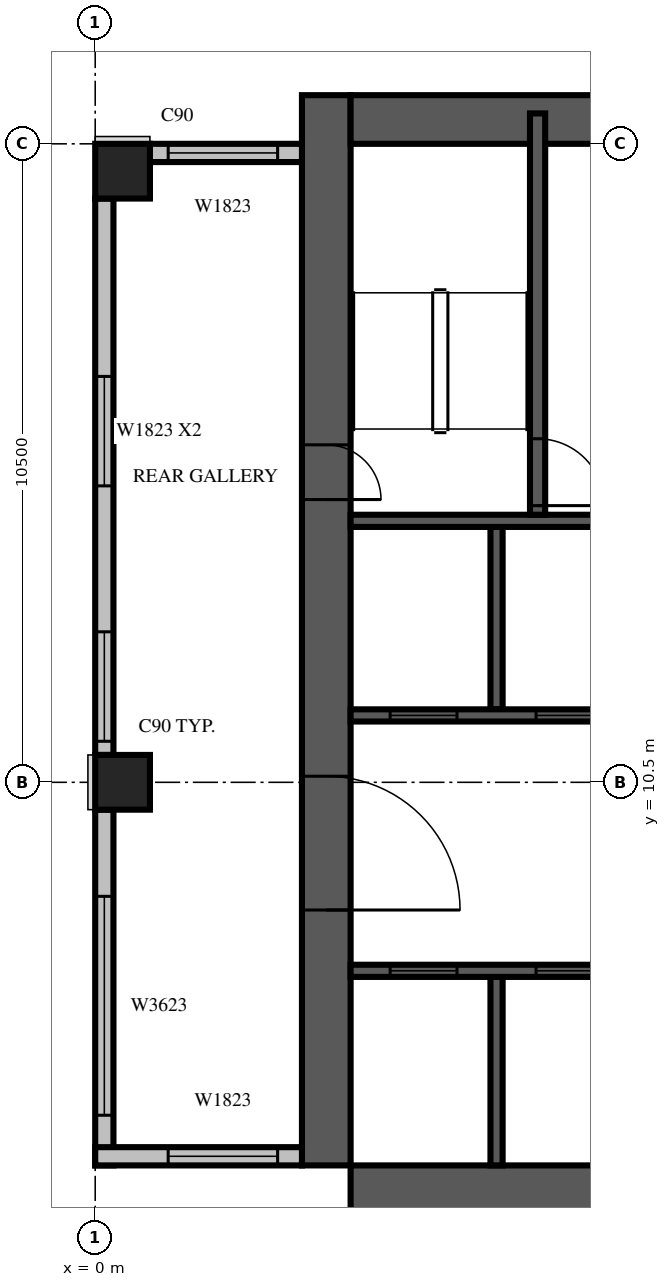
"""IFC4 building model, lengths in metres.
Left out: names, types, materials, properties, quantities, classifications, styles, units other than length and angle.
Written with IfcOpenShell. Run it as: python <this file> out.ifc"""

import sys

from ifc_helpers import new_model, si_unit, direction, frame, frame_2d, origin, origin_2d, place, context, subcontext, project, spatial, rectangle, extrude, source, transform, mapped, element, fill, save


model = new_model("IFC4")
c1 = context("Model", 3, precision=1e-05, world=origin(), true_north=direction((0.0, 1.0)))
c2 = subcontext(c1, "Body", "Model", "MODEL_VIEW")
j1 = project(units=[si_unit("LENGTHUNIT", "METRE"), si_unit("PLANEANGLEUNIT", "RADIAN")], contexts=[c1])
p1 = place(None, origin())
s1 = spatial("IfcSite", under=j1, at=p1, CompositionType="ELEMENT")
p2 = place(p1, origin())
s2 = spatial("IfcBuilding", under=s1, at=p2, CompositionType="ELEMENT")
p3 = place(p2, frame((0.0, 0.0, 189.2)))
s3 = spatial("IfcBuildingStorey", under=s2, at=p3, CompositionType="ELEMENT", Elevation=189.2)
m1 = source(origin(), c2, "Body", "SweptSolid", [
    extrude(rectangle(XDim=0.9, YDim=0.9, at=origin_2d()), origin(), (0.0, 0.0, 1.0), 3.8),
])
for number, where, z_axis, x_axis in (
    (1, (0.45, 10.5, 0.0), (0.0, 0.0, 1.0), (1.0, 0.0, 0.0)),
    (2, (0.45, 20.55, 0.0), (0.0, 0.0, 1.0), (1.0, 0.0, 0.0)),
):
    element("IfcColumn", number, at=place(p3, frame(where, z_axis=z_axis, x_axis=x_axis)), inside=s3, PredefinedType="COLUMN", context=c2, shape_type="MappedRepresentation", body=[
        mapped(m1, transform((0.0, 0.0, 0.0), scale=1.0)),
    ])
m2 = source(origin(), c2, "Body", "SweptSolid", [
    extrude(rectangle(XDim=17.6, YDim=0.8, at=frame_2d((8.8, 0.0))), origin(), (0.0, 0.0, 1.0), 3.8),
])
p4 = place(p3, frame((3.8, 4.2, 0.0), z_axis=(0.0, 0.0, 1.0), x_axis=(0.0, 1.0, 0.0)))
e3 = element("IfcWall", 3, at=p4, inside=s3, PredefinedType="SHEAR", context=c2, shape_type="MappedRepresentation", body=[
    mapped(m2, transform((0.0, 0.0, 0.0), scale=1.0)),
])
m3 = source(origin(), c2, "Body", "SweptSolid", [
    extrude(rectangle(XDim=2.2, YDim=2.1, at=frame_2d((1.1, 1.05))), frame((0.0, 0.41, 0.0), z_axis=(0.0, -1.0, 0.0), x_axis=(1.0, 0.0, 0.0)), (0.0, 0.0, 1.0), 0.82),
])
p5 = place(p4, frame((4.2, 0.0, 0.0)))
e4 = element("IfcOpeningElement", 4, at=p5, cuts=e3, PredefinedType="OPENING", context=c2, shape_type="MappedRepresentation", body=[
    mapped(m3, transform((0.0, 0.0, 0.0), scale=1.0)),
])
m4 = source(origin(), c2, "Body", "SweptSolid", [
    extrude(rectangle(XDim=0.9, YDim=2.1, at=frame_2d((0.45, 1.05))), frame((0.0, 0.41, 0.0), z_axis=(0.0, -1.0, 0.0), x_axis=(1.0, 0.0, 0.0)), (0.0, 0.0, 1.0), 0.82),
])
p6 = place(p4, frame((10.95, 0.0, 0.0)))
e5 = element("IfcOpeningElement", 5, at=p6, cuts=e3, PredefinedType="OPENING", context=c2, shape_type="MappedRepresentation", body=[
    mapped(m4, transform((0.0, 0.0, 0.0), scale=1.0)),
])
p7 = place(p3, frame((4.2, 3.8, 0.0), z_axis=(0.0, 0.0, 1.0), x_axis=(1.0, 0.0, 0.0)))
e6 = element("IfcWall", 6, at=p7, inside=s3, PredefinedType="SHEAR", context=c2, shape_type="MappedRepresentation", body=[
    mapped(m2, transform((0.0, 0.0, 0.0), scale=1.0)),
])
p8 = place(p7, frame((11.55, 0.0, 0.0)))
e7 = element("IfcOpeningElement", 7, at=p8, cuts=e6, PredefinedType="OPENING", context=c2, shape_type="MappedRepresentation", body=[
    mapped(m4, transform((0.0, 0.0, 0.0), scale=1.0)),
])
m5 = source(origin(), c2, "Body", "SweptSolid", [
    extrude(rectangle(XDim=16.8, YDim=0.8, at=frame_2d((8.4, 0.0))), origin(), (0.0, 0.0, 1.0), 3.8),
])
p9 = place(p3, frame((4.2, 21.4, 0.0), z_axis=(0.0, 0.0, 1.0), x_axis=(1.0, 0.0, 0.0)))
e8 = element("IfcWall", 8, at=p9, inside=s3, PredefinedType="SHEAR", context=c2, shape_type="MappedRepresentation", body=[
    mapped(m5, transform((0.0, 0.0, 0.0), scale=1.0)),
])
m6 = source(origin(), c2, "Body", "SweptSolid", [
    extrude(rectangle(XDim=1.2, YDim=2.1, at=frame_2d((0.6, 1.05))), frame((0.0, 0.41, 0.0), z_axis=(0.0, -1.0, 0.0), x_axis=(1.0, 0.0, 0.0)), (0.0, 0.0, 1.0), 0.82),
])
p10 = place(p9, frame((7.4, 0.0, 0.0)))
e9 = element("IfcOpeningElement", 9, at=p10, cuts=e8, PredefinedType="OPENING", context=c2, shape_type="MappedRepresentation", body=[
    mapped(m6, transform((0.0, 0.0, 0.0), scale=1.0)),
])
m7 = source(origin(), c2, "Body", "SweptSolid", [
    extrude(rectangle(XDim=2.5, YDim=0.3, at=frame_2d((1.25, 0.0))), origin(), (0.0, 0.0, 1.0), 3.4),
])
p11 = place(p3, frame((3.4, 20.85, 0.0), z_axis=(0.0, 0.0, 1.0), x_axis=(-1.0, 0.0, 0.0)))
e10 = element("IfcWall", 10, at=p11, inside=s3, PredefinedType="STANDARD", context=c2, shape_type="MappedRepresentation", body=[
    mapped(m7, transform((0.0, 0.0, 0.0), scale=1.0)),
])
m8 = source(origin(), c2, "Body", "SweptSolid", [
    extrude(rectangle(XDim=1.8, YDim=2.3, at=frame_2d((0.9, 1.15))), frame((0.0, 0.16, 0.0), z_axis=(0.0, -1.0, 0.0), x_axis=(1.0, 0.0, 0.0)), (0.0, 0.0, 1.0), 0.32),
])
p12 = place(p11, frame((0.4, 0.0, 0.6)))
e11 = element("IfcOpeningElement", 11, at=p12, cuts=e10, PredefinedType="OPENING", context=c2, shape_type="MappedRepresentation", body=[
    mapped(m8, transform((0.0, 0.0, 0.0), scale=1.0)),
])
m9 = source(origin(), c2, "Body", "SweptSolid", [
    extrude(rectangle(XDim=9.15, YDim=0.3, at=frame_2d((4.575, 0.0))), origin(), (0.0, 0.0, 1.0), 3.4),
])
p13 = place(p3, frame((0.15, 20.1, 0.0), z_axis=(0.0, 0.0, 1.0), x_axis=(0.0, -1.0, 0.0)))
e12 = element("IfcWall", 12, at=p13, inside=s3, PredefinedType="STANDARD", context=c2, shape_type="MappedRepresentation", body=[
    mapped(m9, transform((0.0, 0.0, 0.0), scale=1.0)),
])
p14 = place(p13, frame((2.925, 0.0, 0.6)))
e13 = element("IfcOpeningElement", 13, at=p14, cuts=e12, PredefinedType="OPENING", context=c2, shape_type="MappedRepresentation", body=[
    mapped(m8, transform((0.0, 0.0, 0.0), scale=1.0)),
])
p15 = place(p13, frame((7.125, 0.0, 0.6)))
e14 = element("IfcOpeningElement", 14, at=p15, cuts=e12, PredefinedType="OPENING", context=c2, shape_type="MappedRepresentation", body=[
    mapped(m8, transform((0.0, 0.0, 0.0), scale=1.0)),
])
m10 = source(origin(), c2, "Body", "SweptSolid", [
    extrude(rectangle(XDim=5.85, YDim=0.3, at=frame_2d((2.925, 0.0))), origin(), (0.0, 0.0, 1.0), 3.4),
])
p16 = place(p3, frame((0.15, 10.05, 0.0), z_axis=(0.0, 0.0, 1.0), x_axis=(0.0, -1.0, 0.0)))
e15 = element("IfcWall", 15, at=p16, inside=s3, PredefinedType="STANDARD", context=c2, shape_type="MappedRepresentation", body=[
    mapped(m10, transform((0.0, 0.0, 0.0), scale=1.0)),
])
m11 = source(origin(), c2, "Body", "SweptSolid", [
    extrude(rectangle(XDim=3.6, YDim=2.3, at=frame_2d((1.8, 1.15))), frame((0.0, 0.16, 0.0), z_axis=(0.0, -1.0, 0.0), x_axis=(1.0, 0.0, 0.0)), (0.0, 0.0, 1.0), 0.32),
])
p17 = place(p16, frame((1.425, 0.0, 0.6)))
e16 = element("IfcOpeningElement", 16, at=p17, cuts=e15, PredefinedType="OPENING", context=c2, shape_type="MappedRepresentation", body=[
    mapped(m11, transform((0.0, 0.0, 0.0), scale=1.0)),
])
m12 = source(origin(), c2, "Body", "SweptSolid", [
    extrude(rectangle(XDim=3.4, YDim=0.3, at=frame_2d((1.7, 0.0))), origin(), (0.0, 0.0, 1.0), 3.4),
])
p18 = place(p3, frame((0.0, 4.35, 0.0), z_axis=(0.0, 0.0, 1.0), x_axis=(1.0, 0.0, 0.0)))
e17 = element("IfcWall", 17, at=p18, inside=s3, PredefinedType="STANDARD", context=c2, shape_type="MappedRepresentation", body=[
    mapped(m12, transform((0.0, 0.0, 0.0), scale=1.0)),
])
p19 = place(p18, frame((1.2, 0.0, 0.6)))
e18 = element("IfcOpeningElement", 18, at=p19, cuts=e17, PredefinedType="OPENING", context=c2, shape_type="MappedRepresentation", body=[
    mapped(m8, transform((0.0, 0.0, 0.0), scale=1.0)),
])
m13 = source(origin(), c2, "Body", "SweptSolid", [
    extrude(rectangle(XDim=3.1, YDim=0.2, at=frame_2d((1.55, 0.0))), origin(), (0.0, 0.0, 1.0), 3.8),
])
p20 = place(p3, frame((6.6, 4.2, 0.0), z_axis=(0.0, 0.0, 1.0), x_axis=(0.0, 1.0, 0.0)))
e19 = element("IfcWall", 19, at=p20, inside=s3, PredefinedType="SOLIDWALL", context=c2, shape_type="MappedRepresentation", body=[
    mapped(m13, transform((0.0, 0.0, 0.0), scale=1.0)),
])
m14 = source(origin(), c2, "Body", "SweptSolid", [
    extrude(rectangle(XDim=3.0, YDim=0.2, at=frame_2d((1.5, 0.0))), origin(), (0.0, 0.0, 1.0), 3.8),
])
p21 = place(p3, frame((6.6, 11.7, 0.0), z_axis=(0.0, 0.0, 1.0), x_axis=(0.0, 1.0, 0.0)))
e20 = element("IfcWall", 20, at=p21, inside=s3, PredefinedType="SOLIDWALL", context=c2, shape_type="MappedRepresentation", body=[
    mapped(m14, transform((0.0, 0.0, 0.0), scale=1.0)),
])
m15 = source(origin(), c2, "Body", "SweptSolid", [
    extrude(rectangle(XDim=9.6, YDim=0.2, at=frame_2d((4.8, 0.0))), origin(), (0.0, 0.0, 1.0), 3.8),
])
p22 = place(p3, frame((4.2, 7.4, 0.0), z_axis=(0.0, 0.0, 1.0), x_axis=(1.0, 0.0, 0.0)))
e21 = element("IfcWall", 21, at=p22, inside=s3, PredefinedType="SOLIDWALL", context=c2, shape_type="MappedRepresentation", body=[
    mapped(m15, transform((0.0, 0.0, 0.0), scale=1.0)),
])
m16 = source(origin(), c2, "Body", "SweptSolid", [
    extrude(rectangle(XDim=1.1, YDim=2.1, at=frame_2d((0.55, 1.05))), frame((0.0, 0.11, 0.0), z_axis=(0.0, -1.0, 0.0), x_axis=(1.0, 0.0, 0.0)), (0.0, 0.0, 1.0), 0.22),
])
p23 = place(p22, frame((0.65, 0.0, 0.0)))
e22 = element("IfcOpeningElement", 22, at=p23, cuts=e21, PredefinedType="OPENING", context=c2, shape_type="MappedRepresentation", body=[
    mapped(m16, transform((0.0, 0.0, 0.0), scale=1.0)),
])
p24 = place(p22, frame((3.05, 0.0, 0.0)))
e23 = element("IfcOpeningElement", 23, at=p24, cuts=e21, PredefinedType="OPENING", context=c2, shape_type="MappedRepresentation", body=[
    mapped(m16, transform((0.0, 0.0, 0.0), scale=1.0)),
])
p25 = place(p22, frame((5.45, 0.0, 0.0)))
e24 = element("IfcOpeningElement", 24, at=p25, cuts=e21, PredefinedType="OPENING", context=c2, shape_type="MappedRepresentation", body=[
    mapped(m16, transform((0.0, 0.0, 0.0), scale=1.0)),
])
p26 = place(p22, frame((7.85, 0.0, 0.0)))
e25 = element("IfcOpeningElement", 25, at=p26, cuts=e21, PredefinedType="OPENING", context=c2, shape_type="MappedRepresentation", body=[
    mapped(m16, transform((0.0, 0.0, 0.0), scale=1.0)),
])
m17 = source(origin(), c2, "Body", "SweptSolid", [
    extrude(rectangle(XDim=4.8, YDim=0.2, at=frame_2d((2.4, 0.0))), origin(), (0.0, 0.0, 1.0), 3.8),
])
p27 = place(p3, frame((4.2, 11.6, 0.0), z_axis=(0.0, 0.0, 1.0), x_axis=(1.0, 0.0, 0.0)))
e26 = element("IfcWall", 26, at=p27, inside=s3, PredefinedType="SOLIDWALL", context=c2, shape_type="MappedRepresentation", body=[
    mapped(m17, transform((0.0, 0.0, 0.0), scale=1.0)),
])
p28 = place(p27, frame((0.65, 0.0, 0.0)))
e27 = element("IfcOpeningElement", 27, at=p28, cuts=e26, PredefinedType="OPENING", context=c2, shape_type="MappedRepresentation", body=[
    mapped(m16, transform((0.0, 0.0, 0.0), scale=1.0)),
])
p29 = place(p27, frame((3.05, 0.0, 0.0)))
e28 = element("IfcOpeningElement", 28, at=p29, cuts=e26, PredefinedType="OPENING", context=c2, shape_type="MappedRepresentation", body=[
    mapped(m16, transform((0.0, 0.0, 0.0), scale=1.0)),
])
p30 = place(p3, frame((4.2, 14.8, 0.0), z_axis=(0.0, 0.0, 1.0), x_axis=(1.0, 0.0, 0.0)))
e29 = element("IfcWall", 29, at=p30, inside=s3, PredefinedType="SOLIDWALL", context=c2, shape_type="MappedRepresentation", body=[
    mapped(m17, transform((0.0, 0.0, 0.0), scale=1.0)),
])
m18 = source(origin(), c2, "Body", "SweptSolid", [
    extrude(rectangle(XDim=6.6, YDim=0.25, at=frame_2d((3.3, 0.0))), origin(), (0.0, 0.0, 1.0), 3.4),
])
p31 = place(p3, frame((7.275, 14.9, 0.0), z_axis=(0.0, 0.0, 1.0), x_axis=(0.0, 1.0, 0.0)))
e30 = element("IfcWall", 30, at=p31, inside=s3, PredefinedType="SOLIDWALL", context=c2, shape_type="MappedRepresentation", body=[
    mapped(m18, transform((0.0, 0.0, 0.0), scale=1.0)),
])
m19 = source(origin(), c2, "Body", "SweptSolid", [
    extrude(rectangle(XDim=1.1, YDim=2.1, at=frame_2d((0.55, 1.05))), frame((0.0, 0.135, 0.0), z_axis=(0.0, -1.0, 0.0), x_axis=(1.0, 0.0, 0.0)), (0.0, 0.0, 1.0), 0.27),
])
p32 = place(p31, frame((0.15, 0.0, 0.0)))
e31 = element("IfcOpeningElement", 31, at=p32, cuts=e30, PredefinedType="OPENING", context=c2, shape_type="MappedRepresentation", body=[
    mapped(m19, transform((0.0, 0.0, 0.0), scale=1.0)),
])
m20 = source(origin(), c2, "Body", "SweptSolid", [
    extrude(rectangle(XDim=1.8, YDim=2.3, at=frame_2d((0.9, 1.15))), frame((0.0, 0.03, 0.0), z_axis=(0.0, -1.0, 0.0), x_axis=(1.0, 0.0, 0.0)), (0.0, 0.0, 1.0), 0.06),
])
p33 = place(p12, origin())
e32 = element("IfcWindow", 32, at=p33, inside=s3, PartitioningType="SINGLE_PANEL", PredefinedType="WINDOW", context=c2, shape_type="MappedRepresentation", body=[
    mapped(m20, transform((0.0, 0.0, 0.0), scale=1.0)),
])
fill(e11, e32)
p34 = place(p14, origin())
e33 = element("IfcWindow", 33, at=p34, inside=s3, PartitioningType="SINGLE_PANEL", PredefinedType="WINDOW", context=c2, shape_type="MappedRepresentation", body=[
    mapped(m20, transform((0.0, 0.0, 0.0), scale=1.0)),
])
fill(e13, e33)
p35 = place(p15, origin())
e34 = element("IfcWindow", 34, at=p35, inside=s3, PartitioningType="SINGLE_PANEL", PredefinedType="WINDOW", context=c2, shape_type="MappedRepresentation", body=[
    mapped(m20, transform((0.0, 0.0, 0.0), scale=1.0)),
])
fill(e14, e34)
m21 = source(origin(), c2, "Body", "SweptSolid", [
    extrude(rectangle(XDim=3.6, YDim=2.3, at=frame_2d((1.8, 1.15))), frame((0.0, 0.03, 0.0), z_axis=(0.0, -1.0, 0.0), x_axis=(1.0, 0.0, 0.0)), (0.0, 0.0, 1.0), 0.06),
])
p36 = place(p17, origin())
e35 = element("IfcWindow", 35, at=p36, inside=s3, PartitioningType="SINGLE_PANEL", PredefinedType="WINDOW", context=c2, shape_type="MappedRepresentation", body=[
    mapped(m21, transform((0.0, 0.0, 0.0), scale=1.0)),
])
fill(e16, e35)
p37 = place(p19, origin())
e36 = element("IfcWindow", 36, at=p37, inside=s3, PartitioningType="SINGLE_PANEL", PredefinedType="WINDOW", context=c2, shape_type="MappedRepresentation", body=[
    mapped(m20, transform((0.0, 0.0, 0.0), scale=1.0)),
])
fill(e18, e36)
m22 = source(origin(), c2, "Body", "SweptSolid", [
    extrude(rectangle(XDim=1.1, YDim=2.1, at=frame_2d((0.55, 1.05))), frame((0.0, 0.025, 0.0), z_axis=(0.0, -1.0, 0.0), x_axis=(1.0, 0.0, 0.0)), (0.0, 0.0, 1.0), 0.05),
])
p38 = place(p23, origin())
e37 = element("IfcDoor", 37, at=p38, inside=s3, OperationType="SLIDING_TO_LEFT", PredefinedType="DOOR", context=c2, shape_type="MappedRepresentation", body=[
    mapped(m22, transform((0.0, 0.0, 0.0), scale=1.0)),
])
fill(e22, e37)
p39 = place(p24, origin())
e38 = element("IfcDoor", 38, at=p39, inside=s3, OperationType="SLIDING_TO_LEFT", PredefinedType="DOOR", context=c2, shape_type="MappedRepresentation", body=[
    mapped(m22, transform((0.0, 0.0, 0.0), scale=1.0)),
])
fill(e23, e38)
p40 = place(p28, origin())
e39 = element("IfcDoor", 39, at=p40, inside=s3, OperationType="SLIDING_TO_LEFT", PredefinedType="DOOR", context=c2, shape_type="MappedRepresentation", body=[
    mapped(m22, transform((0.0, 0.0, 0.0), scale=1.0)),
])
fill(e27, e39)
p41 = place(p29, origin())
e40 = element("IfcDoor", 40, at=p41, inside=s3, OperationType="SLIDING_TO_LEFT", PredefinedType="DOOR", context=c2, shape_type="MappedRepresentation", body=[
    mapped(m22, transform((0.0, 0.0, 0.0), scale=1.0)),
])
fill(e28, e40)
p42 = place(p32, origin())
e41 = element("IfcDoor", 41, at=p42, inside=s3, OperationType="SINGLE_SWING_RIGHT", PredefinedType="DOOR", context=c2, shape_type="MappedRepresentation", body=[
    mapped(m22, transform((0.0, 0.0, 0.0), scale=1.0)),
])
fill(e31, e41)
m23 = source(origin(), c2, "Body", "SweptSolid", [
    extrude(rectangle(XDim=2.2, YDim=2.1, at=frame_2d((1.1, 1.05))), frame((0.0, 0.025, 0.0), z_axis=(0.0, -1.0, 0.0), x_axis=(1.0, 0.0, 0.0)), (0.0, 0.0, 1.0), 0.05),
])
p43 = place(p5, origin())
e42 = element("IfcDoor", 42, at=p43, inside=s3, OperationType="DOUBLE_DOOR_SINGLE_SWING", PredefinedType="DOOR", context=c2, shape_type="MappedRepresentation", body=[
    mapped(m23, transform((0.0, 0.0, 0.0), scale=1.0)),
])
fill(e4, e42)
m24 = source(origin(), c2, "Body", "SweptSolid", [
    extrude(rectangle(XDim=0.9, YDim=2.1, at=frame_2d((0.45, 1.05))), frame((0.0, 0.025, 0.0), z_axis=(0.0, -1.0, 0.0), x_axis=(1.0, 0.0, 0.0)), (0.0, 0.0, 1.0), 0.05),
])
p44 = place(p6, origin())
e43 = element("IfcDoor", 43, at=p44, inside=s3, OperationType="SINGLE_SWING_RIGHT", PredefinedType="DOOR", context=c2, shape_type="MappedRepresentation", body=[
    mapped(m24, transform((0.0, 0.0, 0.0), scale=1.0)),
])
fill(e5, e43)
save(model, sys.argv[1])
